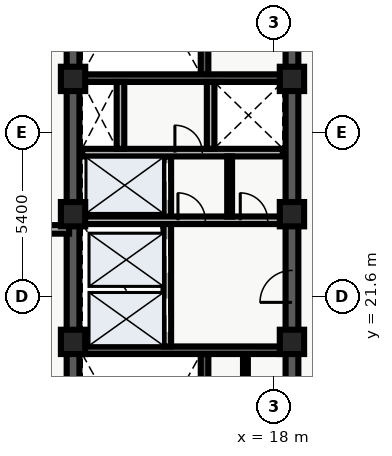
"""IFC4 building model, lengths in metres.
Left out: names, types, materials, properties, quantities, classifications, styles, units other than length and angle.
Written with IfcOpenShell. Run it as: python <this file> out.ifc"""

import sys

from ifc_helpers import new_model, entity, si_unit, converted_unit, direction, frame, origin_with_axes, origin_2d_with_axis, place, context, subcontext, project, spatial, polyline, rectangle, outline, extrude, element, fill, save


model = new_model("IFC4")
c1 = context("Model", 3, precision=1e-05, world=origin_with_axes(), true_north=direction((0.0, 1.0)))
c2 = subcontext(c1, "Body", "Model", "MODEL_VIEW")
j1 = project(units=[si_unit("LENGTHUNIT", "METRE"), converted_unit("PLANEANGLEUNIT", "DEGREE", entity("IfcPlaneAngleMeasure", 0.017), si_unit("PLANEANGLEUNIT", "RADIAN"), dimensions=[0, 0, 0, 0, 0, 0, 0])], contexts=[c1])
p1 = place(None, origin_with_axes())
s1 = spatial("IfcSite", under=j1, at=p1, CompositionType="ELEMENT")
p2 = place(p1, origin_with_axes())
s2 = spatial("IfcBuilding", under=s1, at=p2, CompositionType="ELEMENT")
p3 = place(p2, frame((0.0, 0.0, 268.5), z_axis=(0.0, 0.0, 1.0), x_axis=(1.0, 0.0, 0.0)))
s3 = spatial("IfcBuildingStorey", under=s2, at=p3, CompositionType="ELEMENT", Elevation=268.5)
p4 = place(p3, frame((11.4, 10.8, 0.0), z_axis=(0.0, 0.0, 1.0), x_axis=(0.0, 1.0, 0.0)))
e1 = element("IfcWall", 1, at=p4, inside=s3, PredefinedType="SHEAR", context=c2, shape_type="SweptSolid", body=[
    extrude(outline(polyline([(0.0, -0.21), (27.0, -0.21), (27.0, 0.21), (0.0, 0.21), (0.0, -0.21)])), origin_with_axes(), (0.0, 0.0, 1.0), 3.66),
])
p5 = place(p3, frame((18.6, 10.8, 0.0), z_axis=(0.0, 0.0, 1.0), x_axis=(0.0, 1.0, 0.0)))
e2 = element("IfcWall", 2, at=p5, inside=s3, PredefinedType="SHEAR", context=c2, shape_type="SweptSolid", body=[
    extrude(outline(polyline([(0.0, -0.21), (13.5, -0.21), (13.5, 0.21), (0.0, 0.21), (0.0, -0.21)])), origin_with_axes(), (0.0, 0.0, 1.0), 3.66),
])
p6 = place(p5, frame((1.3, 0.0, 0.0), z_axis=(0.0, 0.0, 1.0), x_axis=(1.0, 0.0, 0.0)))
e3 = element("IfcOpeningElement", 3, at=p6, cuts=e2, PredefinedType="OPENING", context=c2, shape_type="SweptSolid", body=[
    extrude(rectangle(XDim=1.1, YDim=0.44, at=origin_2d_with_axis()), origin_with_axes(), (0.0, 0.0, 1.0), 2.15),
])
p7 = place(p5, frame((3.4, 0.0, 0.0), z_axis=(0.0, 0.0, 1.0), x_axis=(1.0, 0.0, 0.0)))
e4 = element("IfcOpeningElement", 4, at=p7, cuts=e2, PredefinedType="OPENING", context=c2, shape_type="SweptSolid", body=[
    extrude(rectangle(XDim=1.1, YDim=0.44, at=origin_2d_with_axis()), origin_with_axes(), (0.0, 0.0, 1.0), 2.15),
])
p8 = place(p5, frame((11.125, 0.0, 0.0), z_axis=(0.0, 0.0, 1.0), x_axis=(1.0, 0.0, 0.0)))
e5 = element("IfcOpeningElement", 5, at=p8, cuts=e2, PredefinedType="OPENING", context=c2, shape_type="SweptSolid", body=[
    extrude(rectangle(XDim=1.05, YDim=0.44, at=origin_2d_with_axis()), origin_with_axes(), (0.0, 0.0, 1.0), 2.15),
])
p9 = place(p5, frame((6.675, 0.0, 0.0), z_axis=(0.0, 0.0, 1.0), x_axis=(1.0, 0.0, 0.0)))
e6 = element("IfcOpeningElement", 6, at=p9, cuts=e2, PredefinedType="OPENING", context=c2, shape_type="SweptSolid", body=[
    extrude(rectangle(XDim=0.95, YDim=0.44, at=origin_2d_with_axis()), origin_with_axes(), (0.0, 0.0, 1.0), 2.15),
])
p10 = place(p3, frame((18.6, 24.3, 0.0), z_axis=(0.0, 0.0, 1.0), x_axis=(0.0, 1.0, 0.0)))
e7 = element("IfcWall", 7, at=p10, inside=s3, PredefinedType="SHEAR", context=c2, shape_type="SweptSolid", body=[
    extrude(outline(polyline([(0.0, -0.21), (13.5, -0.21), (13.5, 0.21), (0.0, 0.21), (0.0, -0.21)])), origin_with_axes(), (0.0, 0.0, 1.0), 3.66),
])
p11 = place(p10, frame((6.725, 0.0, 0.0), z_axis=(0.0, 0.0, 1.0), x_axis=(1.0, 0.0, 0.0)))
e8 = element("IfcOpeningElement", 8, at=p11, cuts=e7, PredefinedType="OPENING", context=c2, shape_type="SweptSolid", body=[
    extrude(rectangle(XDim=1.05, YDim=0.44, at=origin_2d_with_axis()), origin_with_axes(), (0.0, 0.0, 1.0), 2.15),
])
p12 = place(p10, frame((11.125, 0.0, 0.0), z_axis=(0.0, 0.0, 1.0), x_axis=(1.0, 0.0, 0.0)))
e9 = element("IfcOpeningElement", 9, at=p12, cuts=e7, PredefinedType="OPENING", context=c2, shape_type="SweptSolid", body=[
    extrude(rectangle(XDim=1.05, YDim=0.44, at=origin_2d_with_axis()), origin_with_axes(), (0.0, 0.0, 1.0), 2.15),
])
p13 = place(p3, frame((15.725, 11.01, 0.0), z_axis=(0.0, 0.0, 1.0), x_axis=(0.0, 1.0, 0.0)))
e10 = element("IfcWall", 10, at=p13, inside=s3, PredefinedType="SHEAR", context=c2, shape_type="SweptSolid", body=[
    extrude(outline(polyline([(0.0, -0.125), (8.69, -0.125), (8.69, 0.125), (0.0, 0.125), (0.0, -0.125)])), origin_with_axes(), (0.0, 0.0, 1.0), 3.66),
])
p14 = place(p3, frame((11.61, 19.825, 0.0), z_axis=(0.0, 0.0, 1.0), x_axis=(1.0, 0.0, 0.0)))
e11 = element("IfcWall", 11, at=p14, inside=s3, PredefinedType="SHEAR", context=c2, shape_type="SweptSolid", body=[
    extrude(outline(polyline([(0.0, -0.125), (6.78, -0.125), (6.78, 0.125), (0.0, 0.125), (0.0, -0.125)])), origin_with_axes(), (0.0, 0.0, 1.0), 3.66),
])
p15 = place(p3, frame((15.725, 28.9, 0.0), z_axis=(0.0, 0.0, 1.0), x_axis=(0.0, 1.0, 0.0)))
e12 = element("IfcWall", 12, at=p15, inside=s3, PredefinedType="SHEAR", context=c2, shape_type="SweptSolid", body=[
    extrude(outline(polyline([(0.0, -0.125), (8.69, -0.125), (8.69, 0.125), (0.0, 0.125), (0.0, -0.125)])), origin_with_axes(), (0.0, 0.0, 1.0), 3.66),
])
p16 = place(p3, frame((11.61, 28.775, 0.0), z_axis=(0.0, 0.0, 1.0), x_axis=(1.0, 0.0, 0.0)))
e13 = element("IfcWall", 13, at=p16, inside=s3, PredefinedType="SHEAR", context=c2, shape_type="SweptSolid", body=[
    extrude(outline(polyline([(0.0, -0.125), (6.78, -0.125), (6.78, 0.125), (0.0, 0.125), (0.0, -0.125)])), origin_with_axes(), (0.0, 0.0, 1.0), 3.66),
])
p17 = place(p3, frame((14.5, 19.95, 0.0), z_axis=(0.0, 0.0, 1.0), x_axis=(0.0, 1.0, 0.0)))
e14 = element("IfcWall", 14, at=p17, inside=s3, PredefinedType="SOLIDWALL", context=c2, shape_type="SweptSolid", body=[
    extrude(outline(polyline([(0.0, -0.125), (6.25, -0.125), (6.25, 0.125), (0.0, 0.125), (0.0, -0.125)])), origin_with_axes(), (0.0, 0.0, 1.0), 2.7),
])
p18 = place(p17, frame((1.025, 0.0, 0.0), z_axis=(0.0, 0.0, 1.0), x_axis=(1.0, 0.0, 0.0)))
e15 = element("IfcOpeningElement", 15, at=p18, cuts=e14, PredefinedType="OPENING", context=c2, shape_type="SweptSolid", body=[
    extrude(rectangle(XDim=1.1, YDim=0.27, at=origin_2d_with_axis()), origin_with_axes(), (0.0, 0.0, 1.0), 2.15),
])
p19 = place(p17, frame((2.975, 0.0, 0.0), z_axis=(0.0, 0.0, 1.0), x_axis=(1.0, 0.0, 0.0)))
e16 = element("IfcOpeningElement", 16, at=p19, cuts=e14, PredefinedType="OPENING", context=c2, shape_type="SweptSolid", body=[
    extrude(rectangle(XDim=1.1, YDim=0.27, at=origin_2d_with_axis()), origin_with_axes(), (0.0, 0.0, 1.0), 2.15),
])
p20 = place(p17, frame((5.425, 0.0, 0.0), z_axis=(0.0, 0.0, 1.0), x_axis=(1.0, 0.0, 0.0)))
e17 = element("IfcOpeningElement", 17, at=p20, cuts=e14, PredefinedType="OPENING", context=c2, shape_type="SweptSolid", body=[
    extrude(rectangle(XDim=1.2, YDim=0.27, at=origin_2d_with_axis()), origin_with_axes(), (0.0, 0.0, 1.0), 2.15),
])
p21 = place(p3, frame((11.7, 24.1, 0.0), z_axis=(0.0, 0.0, 1.0), x_axis=(1.0, 0.0, 0.0)))
e18 = element("IfcWall", 18, at=p21, inside=s3, PredefinedType="SOLIDWALL", context=c2, shape_type="SweptSolid", body=[
    extrude(outline(polyline([(0.0, -0.125), (6.6, -0.125), (6.6, 0.125), (0.0, 0.125), (0.0, -0.125)])), origin_with_axes(), (0.0, 0.0, 1.0), 2.7),
])
p22 = place(p21, frame((3.6, 0.0, 0.0), z_axis=(0.0, 0.0, 1.0), x_axis=(1.0, 0.0, 0.0)))
e19 = element("IfcOpeningElement", 19, at=p22, cuts=e18, PredefinedType="OPENING", context=c2, shape_type="SweptSolid", body=[
    extrude(rectangle(XDim=0.9, YDim=0.27, at=origin_2d_with_axis()), origin_with_axes(), (0.0, 0.0, 1.0), 2.15),
])
p23 = place(p21, frame((5.65, 0.0, 0.0), z_axis=(0.0, 0.0, 1.0), x_axis=(1.0, 0.0, 0.0)))
e20 = element("IfcOpeningElement", 20, at=p23, cuts=e18, PredefinedType="OPENING", context=c2, shape_type="SweptSolid", body=[
    extrude(rectangle(XDim=0.9, YDim=0.27, at=origin_2d_with_axis()), origin_with_axes(), (0.0, 0.0, 1.0), 2.15),
])
p24 = place(p3, frame((11.7, 26.325, 0.0), z_axis=(0.0, 0.0, 1.0), x_axis=(1.0, 0.0, 0.0)))
e21 = element("IfcWall", 21, at=p24, inside=s3, PredefinedType="SOLIDWALL", context=c2, shape_type="SweptSolid", body=[
    extrude(outline(polyline([(0.0, -0.125), (6.6, -0.125), (6.6, 0.125), (0.0, 0.125), (0.0, -0.125)])), origin_with_axes(), (0.0, 0.0, 1.0), 2.7),
])
p25 = place(p24, frame((3.5, 0.0, 0.0), z_axis=(0.0, 0.0, 1.0), x_axis=(1.0, 0.0, 0.0)))
e22 = element("IfcOpeningElement", 22, at=p25, cuts=e21, PredefinedType="OPENING", context=c2, shape_type="SweptSolid", body=[
    extrude(rectangle(XDim=0.9, YDim=0.27, at=origin_2d_with_axis()), origin_with_axes(), (0.0, 0.0, 1.0), 2.15),
])
for number, where, z_axis, x_axis in (
    (23, (12.96, 26.45, 0.0), (0.0, 0.0, 1.0), (0.0, 1.0, 0.0)),
    (24, (15.925, 26.45, 0.0), (0.0, 0.0, 1.0), (0.0, 1.0, 0.0)),
):
    element("IfcWall", number, at=place(p3, frame(where, z_axis=z_axis, x_axis=x_axis)), inside=s3, PredefinedType="SOLIDWALL", context=c2, shape_type="SweptSolid", body=[
        extrude(outline(polyline([(0.0, -0.125), (2.2, -0.125), (2.2, 0.125), (0.0, 0.125), (0.0, -0.125)])), origin_with_axes(), (0.0, 0.0, 1.0), 2.7),
    ])
for number, where, z_axis, x_axis in (
    (25, (11.4, 20.1, 0.0), (0.0, 0.0, 1.0), (1.0, 0.0, 0.0)),
    (26, (11.4, 24.3, 0.0), (0.0, 0.0, 1.0), (1.0, 0.0, 0.0)),
    (27, (11.4, 28.75, 0.0), (0.0, 0.0, 1.0), (1.0, 0.0, 0.0)),
    (28, (18.6, 20.1, 0.0), (0.0, 0.0, 1.0), (1.0, 0.0, 0.0)),
    (29, (18.6, 24.3, 0.0), (0.0, 0.0, 1.0), (1.0, 0.0, 0.0)),
    (30, (18.6, 28.75, 0.0), (0.0, 0.0, 1.0), (1.0, 0.0, 0.0)),
):
    element("IfcColumn", number, at=place(p3, frame(where, z_axis=z_axis, x_axis=x_axis)), inside=s3, PredefinedType="COLUMN", context=c2, shape_type="SweptSolid", body=[
        extrude(rectangle(XDim=0.8, YDim=0.8, at=origin_2d_with_axis()), origin_with_axes(), (0.0, 0.0, 1.0), 3.9),
    ])
p26 = place(p3, frame((16.55, 24.22, 0.0), z_axis=(0.0, 0.0, 1.0), x_axis=(0.0, 1.0, 0.0)))
e31 = element("IfcWall", 31, at=p26, inside=s3, PredefinedType="PARTITIONING", context=c2, shape_type="SweptSolid", body=[
    extrude(outline(polyline([(0.0, -0.08), (1.98, -0.08), (1.98, 0.08), (0.0, 0.08), (0.0, -0.08)])), origin_with_axes(), (0.0, 0.0, 1.0), 2.7),
])
p27 = place(p3, frame((17.07, 15.34, 0.0), z_axis=(0.0, 0.0, 1.0), x_axis=(0.0, 1.0, 0.0)))
e32 = element("IfcWall", 32, at=p27, inside=s3, PredefinedType="PARTITIONING", context=c2, shape_type="SweptSolid", body=[
    extrude(outline(polyline([(0.0, -0.08), (4.36, -0.08), (4.36, 0.08), (0.0, 0.08), (0.0, -0.08)])), origin_with_axes(), (0.0, 0.0, 1.0), 2.7),
])
p28 = place(p27, frame((2.05, 0.0, 0.0), z_axis=(0.0, 0.0, 1.0), x_axis=(1.0, 0.0, 0.0)))
e33 = element("IfcOpeningElement", 33, at=p28, cuts=e32, PredefinedType="OPENING", context=c2, shape_type="SweptSolid", body=[
    extrude(rectangle(XDim=0.9, YDim=0.18, at=origin_2d_with_axis()), origin_with_axes(), (0.0, 0.0, 1.0), 2.15),
])
p29 = place(p3, frame((8.135, 23.8, 0.0), z_axis=(0.0, 0.0, 1.0), x_axis=(1.0, 0.0, 0.0)))
e34 = element("IfcWall", 34, at=p29, inside=s3, PredefinedType="PARTITIONING", context=c2, shape_type="SweptSolid", body=[
    extrude(outline(polyline([(0.0, -0.14), (3.135, -0.14), (3.135, 0.14), (0.0, 0.14), (0.0, -0.14)])), origin_with_axes(), (0.0, 0.0, 1.0), 2.7),
])
p30 = place(p17, frame((1.025, 0.0, 0.0), z_axis=(0.0, 0.0, 1.0), x_axis=(1.0, 0.0, 0.0)))
e35 = element("IfcDoor", 35, at=p30, inside=s3, OperationType="SLIDING_TO_LEFT", PredefinedType="DOOR", context=c2, shape_type="SweptSolid", body=[
    extrude(rectangle(XDim=1.1, YDim=0.09, at=origin_2d_with_axis()), origin_with_axes(), (0.0, 0.0, 1.0), 2.15),
])
fill(e15, e35)
p31 = place(p17, frame((2.975, 0.0, 0.0), z_axis=(0.0, 0.0, 1.0), x_axis=(1.0, 0.0, 0.0)))
e36 = element("IfcDoor", 36, at=p31, inside=s3, OperationType="SLIDING_TO_RIGHT", PredefinedType="DOOR", context=c2, shape_type="SweptSolid", body=[
    extrude(rectangle(XDim=1.1, YDim=0.09, at=origin_2d_with_axis()), origin_with_axes(), (0.0, 0.0, 1.0), 2.15),
])
fill(e16, e36)
p32 = place(p17, frame((5.425, 0.0, 0.0), z_axis=(0.0, 0.0, 1.0), x_axis=(1.0, 0.0, 0.0)))
e37 = element("IfcDoor", 37, at=p32, inside=s3, OperationType="DOUBLE_DOOR_SLIDING", PredefinedType="DOOR", context=c2, shape_type="SweptSolid", body=[
    extrude(rectangle(XDim=1.2, YDim=0.09, at=origin_2d_with_axis()), origin_with_axes(), (0.0, 0.0, 1.0), 2.15),
])
fill(e17, e37)
p33 = place(p5, frame((11.125, 0.0, 0.0), z_axis=(0.0, 0.0, 1.0), x_axis=(1.0, 0.0, 0.0)))
e38 = element("IfcDoor", 38, at=p33, inside=s3, OperationType="SINGLE_SWING_LEFT", PredefinedType="DOOR", context=c2, shape_type="SweptSolid", body=[
    extrude(rectangle(XDim=1.05, YDim=0.09, at=origin_2d_with_axis()), origin_with_axes(), (0.0, 0.0, 1.0), 2.15),
])
fill(e5, e38)
p34 = place(p21, frame((3.6, 0.0, 0.0), z_axis=(0.0, 0.0, 1.0), x_axis=(1.0, 0.0, 0.0)))
e39 = element("IfcDoor", 39, at=p34, inside=s3, OperationType="SINGLE_SWING_LEFT", PredefinedType="DOOR", context=c2, shape_type="SweptSolid", body=[
    extrude(rectangle(XDim=0.9, YDim=0.09, at=origin_2d_with_axis()), origin_with_axes(), (0.0, 0.0, 1.0), 2.15),
])
fill(e19, e39)
p35 = place(p21, frame((5.65, 0.0, 0.0), z_axis=(0.0, 0.0, 1.0), x_axis=(1.0, 0.0, 0.0)))
e40 = element("IfcDoor", 40, at=p35, inside=s3, OperationType="SINGLE_SWING_LEFT", PredefinedType="DOOR", context=c2, shape_type="SweptSolid", body=[
    extrude(rectangle(XDim=0.9, YDim=0.09, at=origin_2d_with_axis()), origin_with_axes(), (0.0, 0.0, 1.0), 2.15),
])
fill(e20, e40)
p36 = place(p24, frame((3.5, 0.0, 0.0), z_axis=(0.0, 0.0, 1.0), x_axis=(1.0, 0.0, 0.0)))
e41 = element("IfcDoor", 41, at=p36, inside=s3, OperationType="SINGLE_SWING_LEFT", PredefinedType="DOOR", context=c2, shape_type="SweptSolid", body=[
    extrude(rectangle(XDim=0.9, YDim=0.09, at=origin_2d_with_axis()), origin_with_axes(), (0.0, 0.0, 1.0), 2.15),
])
fill(e22, e41)
save(model, sys.argv[1])
